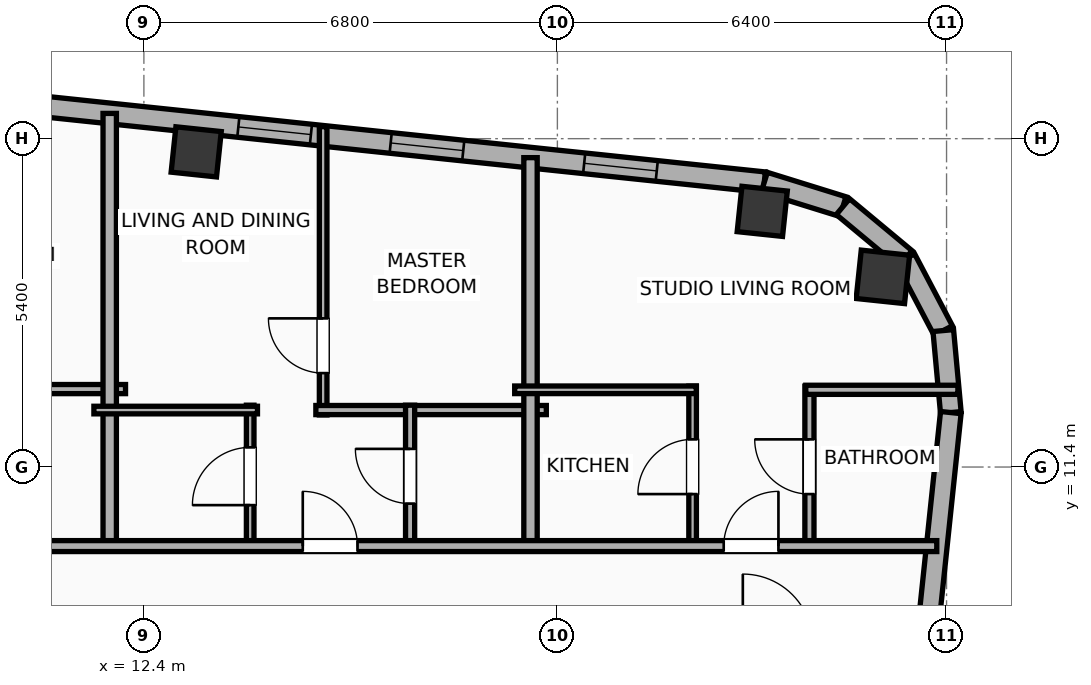
"""IFC4 building model, lengths in metres.
Left out: names, types, materials, properties, quantities, classifications, styles, units other than length and angle.
Written with IfcOpenShell. Run it as: python <this file> out.ifc"""

import sys

from ifc_helpers import new_model, si_unit, direction, frame, frame_2d, origin, origin_2d, place, context, subcontext, project, spatial, rectangle, hollow_rectangle, hollow_circle, extrude, element, fill, save


model = new_model("IFC4")
c1 = context("Model", 3, precision=1e-05, world=origin(), true_north=direction((0.0, 1.0)))
c2 = subcontext(c1, "Body", "Model", "MODEL_VIEW")
j1 = project(units=[si_unit("LENGTHUNIT", "METRE"), si_unit("PLANEANGLEUNIT", "RADIAN")], contexts=[c1])
p1 = place(None, origin())
s1 = spatial("IfcSite", under=j1, at=p1, CompositionType="ELEMENT")
p2 = place(p1, origin())
s2 = spatial("IfcBuilding", under=s1, at=p2, CompositionType="ELEMENT")
p3 = place(p2, frame((0.0, 0.0, 299.0)))
s3 = spatial("IfcBuildingStorey", under=s2, at=p3, CompositionType="ELEMENT", Elevation=299.0)
p4 = place(p3, frame((24.553, 14.527, 0.0), z_axis=(0.0, 0.0, 1.0), x_axis=(0.994521895368, -0.104528463268, 0.0)))
e1 = element("IfcColumn", 1, at=p4, inside=s3, PredefinedType="COLUMN", context=c2, shape_type="SweptSolid", body=[
    extrude(hollow_circle(Radius=0.4, WallThickness=0.028, at=origin_2d()), origin(), (0.0, 0.0, 1.0), 3.9),
])
for number, where, z_axis, x_axis in (
    (2, (22.569, 15.604, 0.0), (0.0, 0.0, 1.0), (0.995, -0.105, 0.0)),
    (3, (13.26, 16.583, 0.0), (0.0, 0.0, 1.0), (0.995, -0.105, 0.0)),
):
    element("IfcColumn", number, at=place(p3, frame(where, z_axis=z_axis, x_axis=x_axis)), inside=s3, PredefinedType="COLUMN", context=c2, shape_type="SweptSolid", body=[
        extrude(hollow_rectangle(XDim=0.75, YDim=0.75, WallThickness=0.025, at=origin_2d()), origin(), (0.0, 0.0, 1.0), 3.9),
    ])
p5 = place(p3, frame((-23.908, 20.972, 0.0), z_axis=(0.0, 0.0, 1.0), x_axis=(0.994521888554, -0.104528528102, 0.0)))
e4 = element("IfcWall", 4, at=p5, inside=s3, PredefinedType="ELEMENTEDWALL", context=c2, shape_type="SweptSolid", body=[
    extrude(rectangle(XDim=46.766, YDim=0.34, at=frame_2d((23.383, 0.0))), origin(), (0.0, 0.0, 1.0), 3.635),
])
p6 = place(p5, frame((5.644, 0.0, 0.65)))
e5 = element("IfcOpeningElement", 5, at=p6, cuts=e4, PredefinedType="OPENING", context=c2, shape_type="SweptSolid", body=[
    extrude(rectangle(XDim=2.6, YDim=2.45, at=frame_2d((1.3, 1.225))), frame((0.0, 0.18, 0.0), z_axis=(0.0, -1.0, 0.0), x_axis=(1.0, 0.0, 0.0)), (0.0, 0.0, 1.0), 0.36),
])
p7 = place(p5, frame((3.05, 0.0, 0.75)))
e6 = element("IfcOpeningElement", 6, at=p7, cuts=e4, PredefinedType="OPENING", context=c2, shape_type="SweptSolid", body=[
    extrude(rectangle(XDim=1.2, YDim=2.05, at=frame_2d((0.6, 1.025))), frame((0.0, 0.18, 0.0), z_axis=(0.0, -1.0, 0.0), x_axis=(1.0, 0.0, 0.0)), (0.0, 0.0, 1.0), 0.36),
])
p8 = place(p5, frame((9.957, 0.0, 0.75)))
e7 = element("IfcOpeningElement", 7, at=p8, cuts=e4, PredefinedType="OPENING", context=c2, shape_type="SweptSolid", body=[
    extrude(rectangle(XDim=1.2, YDim=2.05, at=frame_2d((0.6, 1.025))), frame((0.0, 0.18, 0.0), z_axis=(0.0, -1.0, 0.0), x_axis=(1.0, 0.0, 0.0)), (0.0, 0.0, 1.0), 0.36),
])
p9 = place(p5, frame((13.05, 0.0, 0.75)))
e8 = element("IfcOpeningElement", 8, at=p9, cuts=e4, PredefinedType="OPENING", context=c2, shape_type="SweptSolid", body=[
    extrude(rectangle(XDim=1.2, YDim=2.05, at=frame_2d((0.6, 1.025))), frame((0.0, 0.18, 0.0), z_axis=(0.0, -1.0, 0.0), x_axis=(1.0, 0.0, 0.0)), (0.0, 0.0, 1.0), 0.36),
])
p10 = place(p5, frame((16.383, 0.0, 0.75)))
e9 = element("IfcOpeningElement", 9, at=p10, cuts=e4, PredefinedType="OPENING", context=c2, shape_type="SweptSolid", body=[
    extrude(rectangle(XDim=1.2, YDim=2.05, at=frame_2d((0.6, 1.025))), frame((0.0, 0.18, 0.0), z_axis=(0.0, -1.0, 0.0), x_axis=(1.0, 0.0, 0.0)), (0.0, 0.0, 1.0), 0.36),
])
p11 = place(p5, frame((19.716, 0.0, 0.75)))
e10 = element("IfcOpeningElement", 10, at=p11, cuts=e4, PredefinedType="OPENING", context=c2, shape_type="SweptSolid", body=[
    extrude(rectangle(XDim=1.2, YDim=2.05, at=frame_2d((0.6, 1.025))), frame((0.0, 0.18, 0.0), z_axis=(0.0, -1.0, 0.0), x_axis=(1.0, 0.0, 0.0)), (0.0, 0.0, 1.0), 0.36),
])
p12 = place(p5, frame((23.195, 0.0, 0.75)))
e11 = element("IfcOpeningElement", 11, at=p12, cuts=e4, PredefinedType="OPENING", context=c2, shape_type="SweptSolid", body=[
    extrude(rectangle(XDim=1.2, YDim=2.05, at=frame_2d((0.6, 1.025))), frame((0.0, 0.18, 0.0), z_axis=(0.0, -1.0, 0.0), x_axis=(1.0, 0.0, 0.0)), (0.0, 0.0, 1.0), 0.36),
])
p13 = place(p5, frame((26.194, 0.0, 0.75)))
e12 = element("IfcOpeningElement", 12, at=p13, cuts=e4, PredefinedType="OPENING", context=c2, shape_type="SweptSolid", body=[
    extrude(rectangle(XDim=1.2, YDim=2.05, at=frame_2d((0.6, 1.025))), frame((0.0, 0.18, 0.0), z_axis=(0.0, -1.0, 0.0), x_axis=(1.0, 0.0, 0.0)), (0.0, 0.0, 1.0), 0.36),
])
p14 = place(p5, frame((30.152, 0.0, 0.75)))
e13 = element("IfcOpeningElement", 13, at=p14, cuts=e4, PredefinedType="OPENING", context=c2, shape_type="SweptSolid", body=[
    extrude(rectangle(XDim=1.2, YDim=2.05, at=frame_2d((0.6, 1.025))), frame((0.0, 0.18, 0.0), z_axis=(0.0, -1.0, 0.0), x_axis=(1.0, 0.0, 0.0)), (0.0, 0.0, 1.0), 0.36),
])
p15 = place(p5, frame((33.631, 0.0, 0.75)))
e14 = element("IfcOpeningElement", 14, at=p15, cuts=e4, PredefinedType="OPENING", context=c2, shape_type="SweptSolid", body=[
    extrude(rectangle(XDim=1.2, YDim=2.05, at=frame_2d((0.6, 1.025))), frame((0.0, 0.18, 0.0), z_axis=(0.0, -1.0, 0.0), x_axis=(1.0, 0.0, 0.0)), (0.0, 0.0, 1.0), 0.36),
])
p16 = place(p5, frame((38.07, 0.0, 0.75)))
e15 = element("IfcOpeningElement", 15, at=p16, cuts=e4, PredefinedType="OPENING", context=c2, shape_type="SweptSolid", body=[
    extrude(rectangle(XDim=1.2, YDim=2.05, at=frame_2d((0.6, 1.025))), frame((0.0, 0.18, 0.0), z_axis=(0.0, -1.0, 0.0), x_axis=(1.0, 0.0, 0.0)), (0.0, 0.0, 1.0), 0.36),
])
p17 = place(p5, frame((40.589, 0.0, 0.75)))
e16 = element("IfcOpeningElement", 16, at=p17, cuts=e4, PredefinedType="OPENING", context=c2, shape_type="SweptSolid", body=[
    extrude(rectangle(XDim=1.2, YDim=2.05, at=frame_2d((0.6, 1.025))), frame((0.0, 0.18, 0.0), z_axis=(0.0, -1.0, 0.0), x_axis=(1.0, 0.0, 0.0)), (0.0, 0.0, 1.0), 0.36),
])
p18 = place(p5, frame((43.789, 0.0, 0.75)))
e17 = element("IfcOpeningElement", 17, at=p18, cuts=e4, PredefinedType="OPENING", context=c2, shape_type="SweptSolid", body=[
    extrude(rectangle(XDim=1.2, YDim=2.05, at=frame_2d((0.6, 1.025))), frame((0.0, 0.18, 0.0), z_axis=(0.0, -1.0, 0.0), x_axis=(1.0, 0.0, 0.0)), (0.0, 0.0, 1.0), 0.36),
])
p19 = place(p3, frame((22.603, 16.084, 0.0), z_axis=(0.0, 0.0, 1.0), x_axis=(0.955007802701, -0.296580674994, 0.0)))
e18 = element("IfcWall", 18, at=p19, inside=s3, PredefinedType="ELEMENTEDWALL", context=c2, shape_type="SweptSolid", body=[
    extrude(rectangle(XDim=1.354, YDim=0.34, at=frame_2d((0.677, 0.0))), origin(), (0.0, 0.0, 1.0), 3.635),
])
for number, where, z_axis, x_axis in (
    (19, (23.896, 15.682, 0.0), (0.0, 0.0, 1.0), (0.769, -0.64, 0.0)),
    (20, (24.924, 14.827, 0.0), (0.0, 0.0, 1.0), (0.466, -0.885, 0.0)),
):
    element("IfcWall", number, at=place(p3, frame(where, z_axis=z_axis, x_axis=x_axis)), inside=s3, PredefinedType="ELEMENTEDWALL", context=c2, shape_type="SweptSolid", body=[
        extrude(rectangle(XDim=1.337, YDim=0.34, at=frame_2d((0.668, 0.0))), origin(), (0.0, 0.0, 1.0), 3.635),
    ])
p20 = place(p3, frame((25.546, 13.644, 0.0), z_axis=(0.0, 0.0, 1.0), x_axis=(0.091592370975, -0.995796584438, 0.0)))
e21 = element("IfcWall", 21, at=p20, inside=s3, PredefinedType="ELEMENTEDWALL", context=c2, shape_type="SweptSolid", body=[
    extrude(rectangle(XDim=1.354, YDim=0.34, at=frame_2d((0.677, 0.0))), origin(), (0.0, 0.0, 1.0), 3.635),
])
p21 = place(p3, frame((25.67, 12.296, 0.0), z_axis=(0.0, 0.0, 1.0), x_axis=(-0.104533282919, -0.994521388791, 0.0)))
e22 = element("IfcWall", 22, at=p21, inside=s3, PredefinedType="ELEMENTEDWALL", context=c2, shape_type="SweptSolid", body=[
    extrude(rectangle(XDim=30.366, YDim=0.34, at=frame_2d((15.183, 0.0))), origin(), (0.0, 0.0, 1.0), 3.635),
])
p22 = place(p21, frame((5.442, 0.0, 0.65)))
e23 = element("IfcOpeningElement", 23, at=p22, cuts=e22, PredefinedType="OPENING", context=c2, shape_type="SweptSolid", body=[
    extrude(rectangle(XDim=2.6, YDim=2.45, at=frame_2d((1.3, 1.225))), frame((0.0, 0.18, 0.0), z_axis=(0.0, -1.0, 0.0), x_axis=(1.0, 0.0, 0.0)), (0.0, 0.0, 1.0), 0.36),
])
p23 = place(p21, frame((27.017, 0.0, 0.75)))
e24 = element("IfcOpeningElement", 24, at=p23, cuts=e22, PredefinedType="OPENING", context=c2, shape_type="SweptSolid", body=[
    extrude(rectangle(XDim=1.2, YDim=2.05, at=frame_2d((0.6, 1.025))), frame((0.0, 0.18, 0.0), z_axis=(0.0, -1.0, 0.0), x_axis=(1.0, 0.0, 0.0)), (0.0, 0.0, 1.0), 0.36),
])
p24 = place(p21, frame((17.829, 0.0, 0.75)))
e25 = element("IfcOpeningElement", 25, at=p24, cuts=e22, PredefinedType="OPENING", context=c2, shape_type="SweptSolid", body=[
    extrude(rectangle(XDim=1.2, YDim=2.05, at=frame_2d((0.6, 1.025))), frame((0.0, 0.18, 0.0), z_axis=(0.0, -1.0, 0.0), x_axis=(1.0, 0.0, 0.0)), (0.0, 0.0, 1.0), 0.36),
])
p25 = place(p3, frame((8.308, 12.682, 0.0), z_axis=(0.0, 0.0, 1.0), x_axis=(1.0, 0.0, 0.0)))
e26 = element("IfcWall", 26, at=p25, inside=s3, PredefinedType="PLUMBINGWALL", context=c2, shape_type="SweptSolid", body=[
    extrude(rectangle(XDim=3.79, YDim=0.15, at=frame_2d((1.895, 0.0))), origin(), (0.0, 0.0, 1.0), 3.635),
])
p26 = place(p3, frame((11.838, 10.02, 0.0), z_axis=(0.0, 0.0, 1.0), x_axis=(0.0, 1.0, 0.0)))
e27 = element("IfcWall", 27, at=p26, inside=s3, PredefinedType="PARTITIONING", context=c2, shape_type="SweptSolid", body=[
    extrude(rectangle(XDim=7.195, YDim=0.22, at=frame_2d((3.598, 0.0))), origin(), (0.0, 0.0, 1.0), 3.635),
])
p27 = place(p3, frame((15.348, 12.257, 0.0), z_axis=(0.0, 0.0, 1.0), x_axis=(0.0, 1.0, 0.0)))
e28 = element("IfcWall", 28, at=p27, inside=s3, PredefinedType="PARTITIONING", context=c2, shape_type="SweptSolid", body=[
    extrude(rectangle(XDim=4.74, YDim=0.125, at=frame_2d((2.37, 0.0))), origin(), (0.0, 0.0, 1.0), 3.635),
])
p28 = place(p27, frame((0.688, 0.0, 0.0)))
e29 = element("IfcOpeningElement", 29, at=p28, cuts=e28, PredefinedType="OPENING", context=c2, shape_type="SweptSolid", body=[
    extrude(rectangle(XDim=0.9, YDim=2.05, at=frame_2d((0.45, 1.025))), frame((0.0, 0.073, 0.0), z_axis=(0.0, -1.0, 0.0), x_axis=(1.0, 0.0, 0.0)), (0.0, 0.0, 1.0), 0.145),
])
p29 = place(p3, frame((15.228, 12.337, 0.0), z_axis=(0.0, 0.0, 1.0), x_axis=(1.0, 0.0, 0.0)))
e30 = element("IfcWall", 30, at=p29, inside=s3, PredefinedType="PLUMBINGWALL", context=c2, shape_type="SweptSolid", body=[
    extrude(rectangle(XDim=3.79, YDim=0.15, at=frame_2d((1.895, 0.0))), origin(), (0.0, 0.0, 1.0), 3.635),
])
p30 = place(p3, frame((14.148, 10.08, 0.0), z_axis=(0.0, 0.0, 1.0), x_axis=(0.0, 1.0, 0.0)))
e31 = element("IfcWall", 31, at=p30, inside=s3, PredefinedType="PARTITIONING", context=c2, shape_type="SweptSolid", body=[
    extrude(rectangle(XDim=2.337, YDim=0.125, at=frame_2d((1.168, 0.0))), origin(), (0.0, 0.0, 1.0), 3.635),
])
p31 = place(p30, frame((0.694, 0.0, 0.0)))
e32 = element("IfcOpeningElement", 32, at=p31, cuts=e31, PredefinedType="OPENING", context=c2, shape_type="SweptSolid", body=[
    extrude(rectangle(XDim=0.95, YDim=2.05, at=frame_2d((0.475, 1.025))), frame((0.0, 0.073, 0.0), z_axis=(0.0, -1.0, 0.0), x_axis=(1.0, 0.0, 0.0)), (0.0, 0.0, 1.0), 0.145),
])
p32 = place(p3, frame((11.578, 12.337, 0.0), z_axis=(0.0, 0.0, 1.0), x_axis=(1.0, 0.0, 0.0)))
e33 = element("IfcWall", 33, at=p32, inside=s3, PredefinedType="PARTITIONING", context=c2, shape_type="SweptSolid", body=[
    extrude(rectangle(XDim=2.69, YDim=0.125, at=frame_2d((1.345, 0.0))), origin(), (0.0, 0.0, 1.0), 3.635),
])
p33 = place(p3, frame((16.778, 10.08, 0.0), z_axis=(0.0, 0.0, 1.0), x_axis=(0.0, 1.0, 0.0)))
e34 = element("IfcWall", 34, at=p33, inside=s3, PredefinedType="PLUMBINGWALL", context=c2, shape_type="SweptSolid", body=[
    extrude(rectangle(XDim=2.337, YDim=0.15, at=frame_2d((1.168, 0.0))), origin(), (0.0, 0.0, 1.0), 3.635),
])
p34 = place(p33, frame((0.719, 0.0, 0.0)))
e35 = element("IfcOpeningElement", 35, at=p34, cuts=e34, PredefinedType="OPENING", context=c2, shape_type="SweptSolid", body=[
    extrude(rectangle(XDim=0.9, YDim=2.05, at=frame_2d((0.45, 1.025))), frame((0.0, 0.085, 0.0), z_axis=(0.0, -1.0, 0.0), x_axis=(1.0, 0.0, 0.0)), (0.0, 0.0, 1.0), 0.17),
])
p35 = place(p3, frame((18.758, 10.02, 0.0), z_axis=(0.0, 0.0, 1.0), x_axis=(0.0, 1.0, 0.0)))
e36 = element("IfcWall", 36, at=p35, inside=s3, PredefinedType="PARTITIONING", context=c2, shape_type="SweptSolid", body=[
    extrude(rectangle(XDim=6.468, YDim=0.22, at=frame_2d((3.234, 0.0))), origin(), (0.0, 0.0, 1.0), 3.635),
])
p36 = place(p3, frame((21.424, 10.08, 0.0), z_axis=(0.0, 0.0, 1.0), x_axis=(0.0, 1.0, 0.0)))
e37 = element("IfcWall", 37, at=p36, inside=s3, PredefinedType="PARTITIONING", context=c2, shape_type="SweptSolid", body=[
    extrude(rectangle(XDim=2.65, YDim=0.125, at=frame_2d((1.325, 0.0))), origin(), (0.0, 0.0, 1.0), 3.075),
])
p37 = place(p36, frame((0.875, 0.0, 0.0)))
e38 = element("IfcOpeningElement", 38, at=p37, cuts=e37, PredefinedType="OPENING", context=c2, shape_type="SweptSolid", body=[
    extrude(rectangle(XDim=0.9, YDim=2.05, at=frame_2d((0.45, 1.025))), frame((0.0, 0.073, 0.0), z_axis=(0.0, -1.0, 0.0), x_axis=(1.0, 0.0, 0.0)), (0.0, 0.0, 1.0), 0.145),
])
p38 = place(p3, frame((23.345, 10.08, 0.0), z_axis=(0.0, 0.0, 1.0), x_axis=(0.0, 1.0, 0.0)))
e39 = element("IfcWall", 39, at=p38, inside=s3, PredefinedType="PLUMBINGWALL", context=c2, shape_type="SweptSolid", body=[
    extrude(rectangle(XDim=2.65, YDim=0.15, at=frame_2d((1.325, 0.0))), origin(), (0.0, 0.0, 1.0), 3.635),
])
p39 = place(p38, frame((0.875, 0.0, 0.0)))
e40 = element("IfcOpeningElement", 40, at=p39, cuts=e39, PredefinedType="OPENING", context=c2, shape_type="SweptSolid", body=[
    extrude(rectangle(XDim=0.9, YDim=2.05, at=frame_2d((0.45, 1.025))), frame((0.0, 0.085, 0.0), z_axis=(0.0, -1.0, 0.0), x_axis=(1.0, 0.0, 0.0)), (0.0, 0.0, 1.0), 0.17),
])
p40 = place(p3, frame((18.498, 12.67, 0.0), z_axis=(0.0, 0.0, 1.0), x_axis=(1.0, 0.0, 0.0)))
e41 = element("IfcWall", 41, at=p40, inside=s3, PredefinedType="PARTITIONING", context=c2, shape_type="SweptSolid", body=[
    extrude(rectangle(XDim=2.986, YDim=0.125, at=frame_2d((1.493, 0.0))), origin(), (0.0, 0.0, 1.0), 3.635),
])
p41 = place(p3, frame((23.285, 12.67, 0.0), z_axis=(0.0, 0.0, 1.0), x_axis=(1.0, 0.0, 0.0)))
e42 = element("IfcWall", 42, at=p41, inside=s3, PredefinedType="PLUMBINGWALL", context=c2, shape_type="SweptSolid", body=[
    extrude(rectangle(XDim=2.501, YDim=0.15, at=frame_2d((1.251, 0.0))), origin(), (0.0, 0.0, 1.0), 3.635),
])
p42 = place(p3, frame((-28.516, 10.1, 0.0), z_axis=(0.0, 0.0, 1.0), x_axis=(1.0, 0.0, 0.0)))
e43 = element("IfcWall", 43, at=p42, inside=s3, PredefinedType="PARTITIONING", context=c2, shape_type="SweptSolid", body=[
    extrude(rectangle(XDim=53.955, YDim=0.18, at=frame_2d((26.978, 0.0))), origin(), (0.0, 0.0, 1.0), 3.635),
])
p43 = place(p42, frame((2.998, 0.0, 0.0)))
e44 = element("IfcOpeningElement", 44, at=p43, cuts=e43, PredefinedType="OPENING", context=c2, shape_type="SweptSolid", body=[
    extrude(rectangle(XDim=0.9, YDim=2.05, at=frame_2d((0.45, 1.025))), frame((0.0, 0.1, 0.0), z_axis=(0.0, -1.0, 0.0), x_axis=(1.0, 0.0, 0.0)), (0.0, 0.0, 1.0), 0.2),
])
p44 = place(p42, frame((9.656, 0.0, 0.0)))
e45 = element("IfcOpeningElement", 45, at=p44, cuts=e43, PredefinedType="OPENING", context=c2, shape_type="SweptSolid", body=[
    extrude(rectangle(XDim=0.9, YDim=2.05, at=frame_2d((0.45, 1.025))), frame((0.0, 0.1, 0.0), z_axis=(0.0, -1.0, 0.0), x_axis=(1.0, 0.0, 0.0)), (0.0, 0.0, 1.0), 0.2),
])
p45 = place(p42, frame((16.287, 0.0, 0.0)))
e46 = element("IfcOpeningElement", 46, at=p45, cuts=e43, PredefinedType="OPENING", context=c2, shape_type="SweptSolid", body=[
    extrude(rectangle(XDim=0.9, YDim=2.05, at=frame_2d((0.45, 1.025))), frame((0.0, 0.1, 0.0), z_axis=(0.0, -1.0, 0.0), x_axis=(1.0, 0.0, 0.0)), (0.0, 0.0, 1.0), 0.2),
])
p46 = place(p42, frame((22.918, 0.0, 0.0)))
e47 = element("IfcOpeningElement", 47, at=p46, cuts=e43, PredefinedType="OPENING", context=c2, shape_type="SweptSolid", body=[
    extrude(rectangle(XDim=0.9, YDim=2.05, at=frame_2d((0.45, 1.025))), frame((0.0, 0.1, 0.0), z_axis=(0.0, -1.0, 0.0), x_axis=(1.0, 0.0, 0.0)), (0.0, 0.0, 1.0), 0.2),
])
p47 = place(p42, frame((29.689, 0.0, 0.0)))
e48 = element("IfcOpeningElement", 48, at=p47, cuts=e43, PredefinedType="OPENING", context=c2, shape_type="SweptSolid", body=[
    extrude(rectangle(XDim=0.9, YDim=2.05, at=frame_2d((0.45, 1.025))), frame((0.0, 0.1, 0.0), z_axis=(0.0, -1.0, 0.0), x_axis=(1.0, 0.0, 0.0)), (0.0, 0.0, 1.0), 0.2),
])
p48 = place(p42, frame((36.612, 0.0, 0.0)))
e49 = element("IfcOpeningElement", 49, at=p48, cuts=e43, PredefinedType="OPENING", context=c2, shape_type="SweptSolid", body=[
    extrude(rectangle(XDim=0.9, YDim=2.05, at=frame_2d((0.45, 1.025))), frame((0.0, 0.1, 0.0), z_axis=(0.0, -1.0, 0.0), x_axis=(1.0, 0.0, 0.0)), (0.0, 0.0, 1.0), 0.2),
])
p49 = place(p42, frame((43.529, 0.0, 0.0)))
e50 = element("IfcOpeningElement", 50, at=p49, cuts=e43, PredefinedType="OPENING", context=c2, shape_type="SweptSolid", body=[
    extrude(rectangle(XDim=0.9, YDim=2.05, at=frame_2d((0.45, 1.025))), frame((0.0, 0.1, 0.0), z_axis=(0.0, -1.0, 0.0), x_axis=(1.0, 0.0, 0.0)), (0.0, 0.0, 1.0), 0.2),
])
p50 = place(p42, frame((50.452, 0.0, 0.0)))
e51 = element("IfcOpeningElement", 51, at=p50, cuts=e43, PredefinedType="OPENING", context=c2, shape_type="SweptSolid", body=[
    extrude(rectangle(XDim=0.9, YDim=2.05, at=frame_2d((0.45, 1.025))), frame((0.0, 0.1, 0.0), z_axis=(0.0, -1.0, 0.0), x_axis=(1.0, 0.0, 0.0)), (0.0, 0.0, 1.0), 0.2),
])
p51 = place(p16, origin())
e52 = element("IfcWindow", 52, at=p51, inside=s3, PartitioningType="SINGLE_PANEL", PredefinedType="WINDOW", context=c2, shape_type="SweptSolid", body=[
    extrude(rectangle(XDim=1.2, YDim=2.05, at=frame_2d((0.6, 1.025))), frame((0.0, 0.03, 0.0), z_axis=(0.0, -1.0, 0.0), x_axis=(1.0, 0.0, 0.0)), (0.0, 0.0, 1.0), 0.06),
])
fill(e15, e52)
p52 = place(p17, origin())
e53 = element("IfcWindow", 53, at=p52, inside=s3, PartitioningType="SINGLE_PANEL", PredefinedType="WINDOW", context=c2, shape_type="SweptSolid", body=[
    extrude(rectangle(XDim=1.2, YDim=2.05, at=frame_2d((0.6, 1.025))), frame((0.0, 0.03, 0.0), z_axis=(0.0, -1.0, 0.0), x_axis=(1.0, 0.0, 0.0)), (0.0, 0.0, 1.0), 0.06),
])
fill(e16, e53)
p53 = place(p18, origin())
e54 = element("IfcWindow", 54, at=p53, inside=s3, PartitioningType="SINGLE_PANEL", PredefinedType="WINDOW", context=c2, shape_type="SweptSolid", body=[
    extrude(rectangle(XDim=1.2, YDim=2.05, at=frame_2d((0.6, 1.025))), frame((0.0, 0.03, 0.0), z_axis=(0.0, -1.0, 0.0), x_axis=(1.0, 0.0, 0.0)), (0.0, 0.0, 1.0), 0.06),
])
fill(e17, e54)
p54 = place(p28, origin())
e55 = element("IfcDoor", 55, at=p54, inside=s3, OperationType="SINGLE_SWING_RIGHT", PredefinedType="DOOR", context=c2, shape_type="SweptSolid", body=[
    extrude(rectangle(XDim=0.9, YDim=2.05, at=frame_2d((0.45, 1.025))), frame((0.0, 0.025, 0.0), z_axis=(0.0, -1.0, 0.0), x_axis=(1.0, 0.0, 0.0)), (0.0, 0.0, 1.0), 0.05),
])
fill(e29, e55)
p55 = place(p31, origin())
e56 = element("IfcDoor", 56, at=p55, inside=s3, OperationType="SINGLE_SWING_LEFT", PredefinedType="DOOR", context=c2, shape_type="SweptSolid", body=[
    extrude(rectangle(XDim=0.95, YDim=2.05, at=frame_2d((0.475, 1.025))), frame((0.0, 0.025, 0.0), z_axis=(0.0, -1.0, 0.0), x_axis=(1.0, 0.0, 0.0)), (0.0, 0.0, 1.0), 0.05),
])
fill(e32, e56)
p56 = place(p34, origin())
e57 = element("IfcDoor", 57, at=p56, inside=s3, OperationType="SINGLE_SWING_RIGHT", PredefinedType="DOOR", context=c2, shape_type="SweptSolid", body=[
    extrude(rectangle(XDim=0.9, YDim=2.05, at=frame_2d((0.45, 1.025))), frame((0.0, 0.025, 0.0), z_axis=(0.0, -1.0, 0.0), x_axis=(1.0, 0.0, 0.0)), (0.0, 0.0, 1.0), 0.05),
])
fill(e35, e57)
p57 = place(p37, origin())
e58 = element("IfcDoor", 58, at=p57, inside=s3, OperationType="SINGLE_SWING_LEFT", PredefinedType="DOOR", context=c2, shape_type="SweptSolid", body=[
    extrude(rectangle(XDim=0.9, YDim=2.05, at=frame_2d((0.45, 1.025))), frame((0.0, 0.025, 0.0), z_axis=(0.0, -1.0, 0.0), x_axis=(1.0, 0.0, 0.0)), (0.0, 0.0, 1.0), 0.05),
])
fill(e38, e58)
p58 = place(p39, origin())
e59 = element("IfcDoor", 59, at=p58, inside=s3, OperationType="SINGLE_SWING_RIGHT", PredefinedType="DOOR", context=c2, shape_type="SweptSolid", body=[
    extrude(rectangle(XDim=0.9, YDim=2.05, at=frame_2d((0.45, 1.025))), frame((0.0, 0.025, 0.0), z_axis=(0.0, -1.0, 0.0), x_axis=(1.0, 0.0, 0.0)), (0.0, 0.0, 1.0), 0.05),
])
fill(e40, e59)
p59 = place(p49, origin())
e60 = element("IfcDoor", 60, at=p59, inside=s3, OperationType="SINGLE_SWING_LEFT", PredefinedType="DOOR", context=c2, shape_type="SweptSolid", body=[
    extrude(rectangle(XDim=0.9, YDim=2.05, at=frame_2d((0.45, 1.025))), frame((0.0, 0.025, 0.0), z_axis=(0.0, -1.0, 0.0), x_axis=(1.0, 0.0, 0.0)), (0.0, 0.0, 1.0), 0.05),
])
fill(e50, e60)
p60 = place(p50, origin())
e61 = element("IfcDoor", 61, at=p60, inside=s3, OperationType="SINGLE_SWING_RIGHT", PredefinedType="DOOR", context=c2, shape_type="SweptSolid", body=[
    extrude(rectangle(XDim=0.9, YDim=2.05, at=frame_2d((0.45, 1.025))), frame((0.0, 0.025, 0.0), z_axis=(0.0, -1.0, 0.0), x_axis=(1.0, 0.0, 0.0)), (0.0, 0.0, 1.0), 0.05),
])
fill(e51, e61)
save(model, sys.argv[1])
